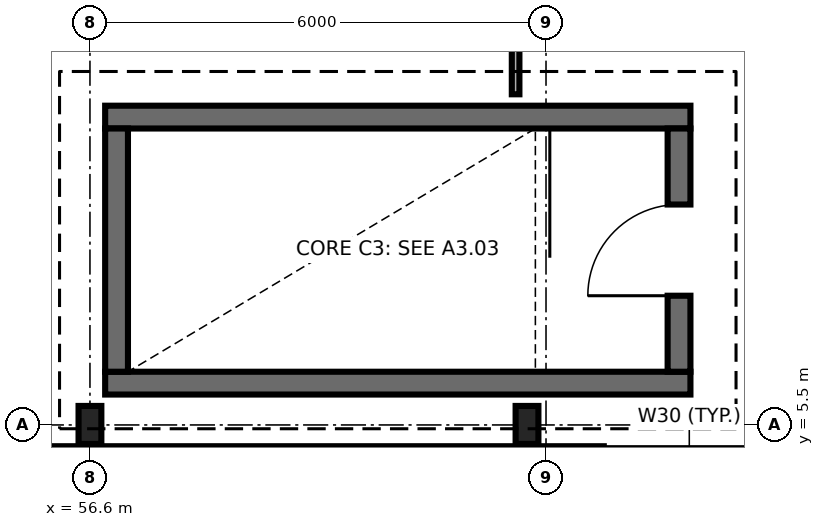
"""IFC4 building model, lengths in metres.
Left out: names, types, materials, properties, quantities, classifications, styles, units other than length and angle.
Written with IfcOpenShell. Run it as: python <this file> out.ifc"""

import sys

from ifc_helpers import new_model, si_unit, direction, frame, frame_2d, origin, origin_2d, place, context, subcontext, project, spatial, rectangle, i_section, extrude, element, fill, save


model = new_model("IFC4")
c1 = context("Model", 3, precision=1e-05, world=origin(), true_north=direction((0.0, 1.0)))
c2 = subcontext(c1, "Body", "Model", "MODEL_VIEW")
j1 = project(units=[si_unit("LENGTHUNIT", "METRE"), si_unit("PLANEANGLEUNIT", "RADIAN")], contexts=[c1])
p1 = place(None, origin())
s1 = spatial("IfcSite", under=j1, at=p1, CompositionType="ELEMENT")
p2 = place(p1, origin())
s2 = spatial("IfcBuilding", under=s1, at=p2, CompositionType="ELEMENT")
p3 = place(p2, frame((0.0, 0.0, 13.8)))
s3 = spatial("IfcBuildingStorey", under=s2, at=p3, CompositionType="ELEMENT", Elevation=13.8)
p4 = place(p3, frame((56.6, 5.5, 0.0), z_axis=(0.0, 0.0, 1.0), x_axis=(1.0, 0.0, 0.0)))
e1 = element("IfcColumn", 1, at=p4, inside=s3, PredefinedType="COLUMN", context=c2, shape_type="SweptSolid", body=[
    extrude(i_section(OverallWidth=0.3, OverallDepth=0.5, WebThickness=0.014, FlangeThickness=0.028, FilletRadius=0.027, at=origin_2d()), origin(), (0.0, 0.0, 1.0), 4.578),
])
p5 = place(p3, frame((62.35, 5.5, 0.0), z_axis=(0.0, 0.0, 1.0), x_axis=(1.0, 0.0, 0.0)))
e2 = element("IfcColumn", 2, at=p5, inside=s3, PredefinedType="COLUMN", context=c2, shape_type="SweptSolid", body=[
    extrude(i_section(OverallWidth=0.3, OverallDepth=0.5, WebThickness=0.014, FlangeThickness=0.028, FilletRadius=0.027, at=origin_2d()), origin(), (0.0, 0.0, 1.0), 6.338),
])
for number, where, z_axis, x_axis in (
    (3, (56.8, 6.05, 0.0), (0.0, 0.0, 1.0), (1.0, 0.0, 0.0)),
    (4, (64.5, 9.55, 0.0), (0.0, 0.0, 1.0), (-1.0, 0.0, 0.0)),
):
    element("IfcWall", number, at=place(p3, frame(where, z_axis=z_axis, x_axis=x_axis)), inside=s3, PredefinedType="SHEAR", context=c2, shape_type="SweptSolid", body=[
        extrude(rectangle(XDim=7.7, YDim=0.3, at=frame_2d((3.85, 0.0))), origin(), (0.0, 0.0, 1.0), 4.5),
    ])
p6 = place(p3, frame((56.95, 9.4, 0.0), z_axis=(0.0, 0.0, 1.0), x_axis=(0.0, -1.0, 0.0)))
e5 = element("IfcWall", 5, at=p6, inside=s3, PredefinedType="SHEAR", context=c2, shape_type="SweptSolid", body=[
    extrude(rectangle(XDim=3.2, YDim=0.3, at=frame_2d((1.6, 0.0))), origin(), (0.0, 0.0, 1.0), 4.5),
])
p7 = place(p3, frame((64.35, 6.2, 0.0), z_axis=(0.0, 0.0, 1.0), x_axis=(0.0, 1.0, 0.0)))
e6 = element("IfcWall", 6, at=p7, inside=s3, PredefinedType="SHEAR", context=c2, shape_type="SweptSolid", body=[
    extrude(rectangle(XDim=3.2, YDim=0.3, at=frame_2d((1.6, 0.0))), origin(), (0.0, 0.0, 1.0), 4.5),
])
p8 = place(p7, frame((1.0, 0.0, 0.0)))
e7 = element("IfcOpeningElement", 7, at=p8, cuts=e6, PredefinedType="OPENING", context=c2, shape_type="SweptSolid", body=[
    extrude(rectangle(XDim=1.2, YDim=2.15, at=frame_2d((0.6, 1.075))), frame((0.0, 0.16, 0.0), z_axis=(0.0, -1.0, 0.0), x_axis=(1.0, 0.0, 0.0)), (0.0, 0.0, 1.0), 0.32),
])
p9 = place(p3, frame((55.002, 5.06, 0.0), z_axis=(0.0, 0.0, 1.0), x_axis=(1.0, 0.0, 0.0)))
e8 = element("IfcWall", 8, at=p9, inside=s3, PredefinedType="SHEAR", context=c2, shape_type="SweptSolid", body=[
    extrude(rectangle(XDim=12.299, YDim=0.32, at=frame_2d((6.149, 0.0))), origin(), (0.0, 0.0, 1.0), 4.62),
])
p10 = place(p9, frame((8.358, 0.0, 0.9)))
e9 = element("IfcOpeningElement", 9, at=p10, cuts=e8, PredefinedType="OPENING", context=c2, shape_type="SweptSolid", body=[
    extrude(rectangle(XDim=2.25, YDim=1.95, at=frame_2d((1.125, 0.975))), frame((0.0, 0.17, 0.0), z_axis=(0.0, -1.0, 0.0), x_axis=(1.0, 0.0, 0.0)), (0.0, 0.0, 1.0), 0.34),
])
p11 = place(p3, frame((62.2, 9.85, 0.0), z_axis=(0.0, 0.0, 1.0), x_axis=(0.0, 1.0, 0.0)))
e10 = element("IfcWall", 10, at=p11, inside=s3, PredefinedType="PARTITIONING", context=c2, shape_type="SweptSolid", body=[
    extrude(rectangle(XDim=31.4, YDim=0.1, at=frame_2d((15.7, 0.0))), origin(), (0.0, 0.0, 1.0), 4.25),
])
p12 = place(p11, frame((9.753, 0.0, 0.0)))
e11 = element("IfcOpeningElement", 11, at=p12, cuts=e10, PredefinedType="OPENING", context=c2, shape_type="SweptSolid", body=[
    extrude(rectangle(XDim=0.95, YDim=2.1, at=frame_2d((0.475, 1.05))), frame((0.0, 0.06, 0.0), z_axis=(0.0, -1.0, 0.0), x_axis=(1.0, 0.0, 0.0)), (0.0, 0.0, 1.0), 0.12),
])
p13 = place(p11, frame((21.837, 0.0, 0.0)))
e12 = element("IfcOpeningElement", 12, at=p13, cuts=e10, PredefinedType="OPENING", context=c2, shape_type="SweptSolid", body=[
    extrude(rectangle(XDim=1.1, YDim=2.15, at=frame_2d((0.55, 1.075))), frame((0.0, 0.06, 0.0), z_axis=(0.0, -1.0, 0.0), x_axis=(1.0, 0.0, 0.0)), (0.0, 0.0, 1.0), 0.12),
])
p14 = place(p8, origin())
e13 = element("IfcDoor", 13, at=p14, inside=s3, OperationType="SINGLE_SWING_LEFT", PredefinedType="DOOR", context=c2, shape_type="SweptSolid", body=[
    extrude(rectangle(XDim=1.2, YDim=2.15, at=frame_2d((0.6, 1.075))), frame((0.0, 0.025, 0.0), z_axis=(0.0, -1.0, 0.0), x_axis=(1.0, 0.0, 0.0)), (0.0, 0.0, 1.0), 0.05),
])
fill(e7, e13)
save(model, sys.argv[1])
